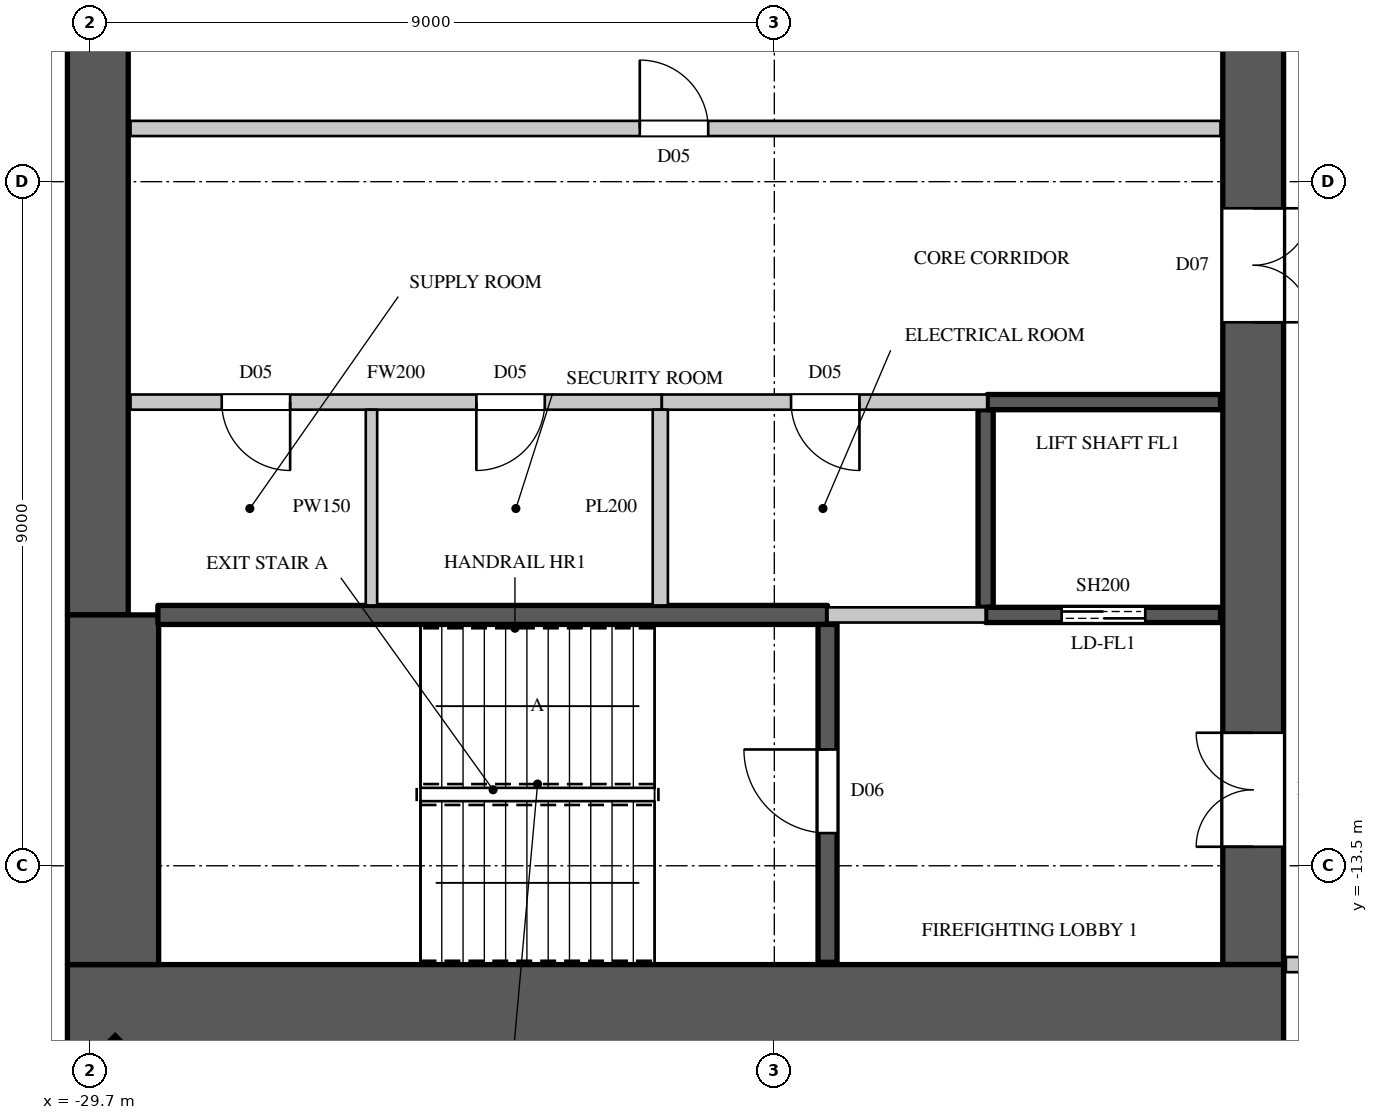
"""IFC4 building model, lengths in metres.
Left out: names, types, materials, properties, quantities, classifications, styles, units other than length and angle.
Written with IfcOpenShell. Run it as: python <this file> out.ifc"""

import sys

from ifc_helpers import new_model, si_unit, direction, frame, frame_2d, origin, origin_2d, place, context, subcontext, project, spatial, rectangle, extrude, element, fill, save


model = new_model("IFC4")
c1 = context("Model", 3, precision=1e-05, world=origin(), true_north=direction((0.0, 1.0)))
c2 = subcontext(c1, "Body", "Model", "MODEL_VIEW")
j1 = project(units=[si_unit("LENGTHUNIT", "METRE"), si_unit("PLANEANGLEUNIT", "RADIAN")], contexts=[c1])
p1 = place(None, origin())
s1 = spatial("IfcSite", under=j1, at=p1, CompositionType="ELEMENT")
p2 = place(p1, origin())
s2 = spatial("IfcBuilding", under=s1, at=p2, CompositionType="ELEMENT")
p3 = place(p2, frame((0.0, 0.0, 181.0)))
s3 = spatial("IfcBuildingStorey", under=s2, at=p3, CompositionType="ELEMENT", Elevation=181.0)
p4 = place(p3, frame((-29.443, -16.443, 0.0), z_axis=(0.0, 0.0, 1.0), x_axis=(0.707106781187, -0.707106781187, 0.0)))
e1 = element("IfcColumn", 1, at=p4, inside=s3, PredefinedType="COLUMN", context=c2, shape_type="SweptSolid", body=[
    extrude(rectangle(XDim=0.9, YDim=1.1, at=origin_2d()), origin(), (0.0, 0.0, 1.0), 4.1),
])
p5 = place(p3, frame((-30.0, -15.4, 0.0), z_axis=(0.0, 0.0, 1.0), x_axis=(1.0, 0.0, 0.0)))
e2 = element("IfcWall", 2, at=p5, inside=s3, PredefinedType="SHEAR", context=c2, shape_type="SweptSolid", body=[
    extrude(rectangle(XDim=16.0, YDim=1.2, at=frame_2d((8.0, 0.0))), origin(), (0.0, 0.0, 1.0), 4.1),
])
p6 = place(p3, frame((-14.4, -14.8, 0.0), z_axis=(0.0, 0.0, 1.0), x_axis=(0.0, 1.0, 0.0)))
e3 = element("IfcWall", 3, at=p6, inside=s3, PredefinedType="SHEAR", context=c2, shape_type="SweptSolid", body=[
    extrude(rectangle(XDim=29.6, YDim=0.8, at=frame_2d((14.8, 0.0))), origin(), (0.0, 0.0, 1.0), 4.1),
])
p7 = place(p6, frame((1.55, 0.0, 0.0)))
e4 = element("IfcOpeningElement", 4, at=p7, cuts=e3, PredefinedType="OPENING", context=c2, shape_type="SweptSolid", body=[
    extrude(rectangle(XDim=1.5, YDim=2.4, at=frame_2d((0.75, 1.2))), frame((0.0, 0.41, 0.0), z_axis=(0.0, -1.0, 0.0), x_axis=(1.0, 0.0, 0.0)), (0.0, 0.0, 1.0), 0.82),
])
p8 = place(p6, frame((26.55, 0.0, 0.0)))
e5 = element("IfcOpeningElement", 5, at=p8, cuts=e3, PredefinedType="OPENING", context=c2, shape_type="SweptSolid", body=[
    extrude(rectangle(XDim=1.5, YDim=2.4, at=frame_2d((0.75, 1.2))), frame((0.0, 0.41, 0.0), z_axis=(0.0, -1.0, 0.0), x_axis=(1.0, 0.0, 0.0)), (0.0, 0.0, 1.0), 0.82),
])
p9 = place(p6, frame((8.45, 0.0, 0.0)))
e6 = element("IfcOpeningElement", 6, at=p9, cuts=e3, PredefinedType="OPENING", context=c2, shape_type="SweptSolid", body=[
    extrude(rectangle(XDim=1.5, YDim=2.4, at=frame_2d((0.75, 1.2))), frame((0.0, 0.41, 0.0), z_axis=(0.0, -1.0, 0.0), x_axis=(1.0, 0.0, 0.0)), (0.0, 0.0, 1.0), 0.82),
])
p10 = place(p6, frame((19.65, 0.0, 0.0)))
e7 = element("IfcOpeningElement", 7, at=p10, cuts=e3, PredefinedType="OPENING", context=c2, shape_type="SweptSolid", body=[
    extrude(rectangle(XDim=1.5, YDim=2.4, at=frame_2d((0.75, 1.2))), frame((0.0, 0.41, 0.0), z_axis=(0.0, -1.0, 0.0), x_axis=(1.0, 0.0, 0.0)), (0.0, 0.0, 1.0), 0.82),
])
p11 = place(p6, frame((14.5, 0.0, 0.0)))
e8 = element("IfcOpeningElement", 8, at=p11, cuts=e3, PredefinedType="OPENING", context=c2, shape_type="SweptSolid", body=[
    extrude(rectangle(XDim=0.6, YDim=2.0, at=frame_2d((0.3, 1.0))), frame((0.0, 0.41, 0.0), z_axis=(0.0, -1.0, 0.0), x_axis=(1.0, 0.0, 0.0)), (0.0, 0.0, 1.0), 0.82),
])
p12 = place(p3, frame((-29.6, -10.2, 0.0), z_axis=(0.0, 0.0, 1.0), x_axis=(0.0, 1.0, 0.0)))
e9 = element("IfcWall", 9, at=p12, inside=s3, PredefinedType="SHEAR", context=c2, shape_type="SweptSolid", body=[
    extrude(rectangle(XDim=20.4, YDim=0.8, at=frame_2d((10.2, 0.0))), origin(), (0.0, 0.0, 1.0), 4.1),
])
p13 = place(p3, frame((-29.4, -14.8, 0.0), z_axis=(0.0, 0.0, 1.0), x_axis=(0.0, 1.0, 0.0)))
e10 = element("IfcWall", 10, at=p13, inside=s3, PredefinedType="SHEAR", context=c2, shape_type="SweptSolid", body=[
    extrude(rectangle(XDim=4.6, YDim=1.2, at=frame_2d((2.3, 0.0))), origin(), (0.0, 0.0, 1.0), 4.1),
])
p14 = place(p3, frame((-29.17, -7.4, 0.0), z_axis=(0.0, 0.0, 1.0), x_axis=(1.0, 0.0, 0.0)))
e11 = element("IfcWall", 11, at=p14, inside=s3, PredefinedType="PARTITIONING", context=c2, shape_type="SweptSolid", body=[
    extrude(rectangle(XDim=6.99, YDim=0.2, at=frame_2d((3.495, 0.0))), origin(), (0.0, 0.0, 1.0), 3.8),
])
p15 = place(p14, frame((1.2, 0.0, 0.0)))
e12 = element("IfcOpeningElement", 12, at=p15, cuts=e11, PredefinedType="OPENING", context=c2, shape_type="SweptSolid", body=[
    extrude(rectangle(XDim=0.9, YDim=2.2, at=frame_2d((0.45, 1.1))), frame((0.0, 0.11, 0.0), z_axis=(0.0, -1.0, 0.0), x_axis=(1.0, 0.0, 0.0)), (0.0, 0.0, 1.0), 0.22),
])
p16 = place(p14, frame((4.55, 0.0, 0.0)))
e13 = element("IfcOpeningElement", 13, at=p16, cuts=e11, PredefinedType="OPENING", context=c2, shape_type="SweptSolid", body=[
    extrude(rectangle(XDim=0.9, YDim=2.2, at=frame_2d((0.45, 1.1))), frame((0.0, 0.11, 0.0), z_axis=(0.0, -1.0, 0.0), x_axis=(1.0, 0.0, 0.0)), (0.0, 0.0, 1.0), 0.22),
])
p17 = place(p3, frame((-29.17, -3.8, 0.0), z_axis=(0.0, 0.0, 1.0), x_axis=(1.0, 0.0, 0.0)))
e14 = element("IfcWall", 14, at=p17, inside=s3, PredefinedType="PARTITIONING", context=c2, shape_type="SweptSolid", body=[
    extrude(rectangle(XDim=14.34, YDim=0.2, at=frame_2d((7.17, 0.0))), origin(), (0.0, 0.0, 1.0), 3.8),
])
p18 = place(p17, frame((6.7, 0.0, 0.0)))
e15 = element("IfcOpeningElement", 15, at=p18, cuts=e14, PredefinedType="OPENING", context=c2, shape_type="SweptSolid", body=[
    extrude(rectangle(XDim=0.9, YDim=2.2, at=frame_2d((0.45, 1.1))), frame((0.0, 0.11, 0.0), z_axis=(0.0, -1.0, 0.0), x_axis=(1.0, 0.0, 0.0)), (0.0, 0.0, 1.0), 0.22),
])
p19 = place(p3, frame((-13.97, -14.8, 0.0), z_axis=(0.0, 0.0, 1.0), x_axis=(1.0, 0.0, 0.0)))
e16 = element("IfcWall", 16, at=p19, inside=s3, PredefinedType="PARTITIONING", context=c2, shape_type="SweptSolid", body=[
    extrude(rectangle(XDim=2.87, YDim=0.2, at=frame_2d((1.435, 0.0))), origin(), (0.0, 0.0, 1.0), 3.8),
])
p20 = place(p3, frame((-26.0, -10.075, 0.0), z_axis=(0.0, 0.0, 1.0), x_axis=(0.0, 1.0, 0.0)))
e17 = element("IfcWall", 17, at=p20, inside=s3, PredefinedType="PARTITIONING", context=c2, shape_type="SweptSolid", body=[
    extrude(rectangle(XDim=2.575, YDim=0.15, at=frame_2d((1.288, 0.0))), origin(), (0.0, 0.0, 1.0), 3.8),
])
p21 = place(p3, frame((-22.18, -7.4, 0.0), z_axis=(0.0, 0.0, 1.0), x_axis=(1.0, 0.0, 0.0)))
e18 = element("IfcWall", 18, at=p21, inside=s3, PredefinedType="PARTITIONING", context=c2, shape_type="SweptSolid", body=[
    extrude(rectangle(XDim=4.28, YDim=0.2, at=frame_2d((2.14, 0.0))), origin(), (0.0, 0.0, 1.0), 3.8),
])
p22 = place(p21, frame((1.7, 0.0, 0.0)))
e19 = element("IfcOpeningElement", 19, at=p22, cuts=e18, PredefinedType="OPENING", context=c2, shape_type="SweptSolid", body=[
    extrude(rectangle(XDim=0.9, YDim=2.2, at=frame_2d((0.45, 1.1))), frame((0.0, 0.11, 0.0), z_axis=(0.0, -1.0, 0.0), x_axis=(1.0, 0.0, 0.0)), (0.0, 0.0, 1.0), 0.22),
])
p23 = place(p3, frame((-22.2, -10.075, 0.0), z_axis=(0.0, 0.0, 1.0), x_axis=(0.0, 1.0, 0.0)))
e20 = element("IfcWall", 20, at=p23, inside=s3, PredefinedType="PARTITIONING", context=c2, shape_type="SweptSolid", body=[
    extrude(rectangle(XDim=2.575, YDim=0.2, at=frame_2d((1.288, 0.0))), origin(), (0.0, 0.0, 1.0), 3.8),
])
p24 = place(p3, frame((-20.0, -10.2, 0.0), z_axis=(0.0, 0.0, 1.0), x_axis=(1.0, 0.0, 0.0)))
e21 = element("IfcWall", 21, at=p24, inside=s3, PredefinedType="PARTITIONING", context=c2, shape_type="SweptSolid", body=[
    extrude(rectangle(XDim=2.08, YDim=0.2, at=frame_2d((1.04, 0.0))), origin(), (0.0, 0.0, 1.0), 3.8),
])
p25 = place(p3, frame((-17.92, -10.1, 0.0), z_axis=(0.0, 0.0, 1.0), x_axis=(0.0, 1.0, 0.0)))
e22 = element("IfcWall", 22, at=p25, inside=s3, PredefinedType="SHEAR", context=c2, shape_type="SweptSolid", body=[
    extrude(rectangle(XDim=2.6, YDim=0.2, at=frame_2d((1.3, 0.0))), origin(), (0.0, 0.0, 1.0), 3.8),
])
p26 = place(p3, frame((-17.92, -10.2, 0.0), z_axis=(0.0, 0.0, 1.0), x_axis=(1.0, 0.0, 0.0)))
e23 = element("IfcWall", 23, at=p26, inside=s3, PredefinedType="SHEAR", context=c2, shape_type="SweptSolid", body=[
    extrude(rectangle(XDim=3.09, YDim=0.2, at=frame_2d((1.545, 0.0))), origin(), (0.0, 0.0, 1.0), 3.8),
])
p27 = place(p26, frame((1.0, 0.0, 0.0)))
e24 = element("IfcOpeningElement", 24, at=p27, cuts=e23, PredefinedType="OPENING", context=c2, shape_type="SweptSolid", body=[
    extrude(rectangle(XDim=1.1, YDim=2.2, at=frame_2d((0.55, 1.1))), frame((0.0, 0.11, 0.0), z_axis=(0.0, -1.0, 0.0), x_axis=(1.0, 0.0, 0.0)), (0.0, 0.0, 1.0), 0.22),
])
p28 = place(p3, frame((-17.9, -7.4, 0.0), z_axis=(0.0, 0.0, 1.0), x_axis=(1.0, 0.0, 0.0)))
e25 = element("IfcWall", 25, at=p28, inside=s3, PredefinedType="SHEAR", context=c2, shape_type="SweptSolid", body=[
    extrude(rectangle(XDim=3.07, YDim=0.2, at=frame_2d((1.535, 0.0))), origin(), (0.0, 0.0, 1.0), 3.8),
])
p29 = place(p3, frame((-28.81, -10.2, 0.0), z_axis=(0.0, 0.0, 1.0), x_axis=(1.0, 0.0, 0.0)))
e26 = element("IfcWall", 26, at=p29, inside=s3, PredefinedType="SHEAR", context=c2, shape_type="SweptSolid", body=[
    extrude(rectangle(XDim=8.81, YDim=0.25, at=frame_2d((4.405, 0.0))), origin(), (0.0, 0.0, 1.0), 3.8),
])
p30 = place(p3, frame((-20.0, -14.77, 0.0), z_axis=(0.0, 0.0, 1.0), x_axis=(0.0, 1.0, 0.0)))
e27 = element("IfcWall", 27, at=p30, inside=s3, PredefinedType="SHEAR", context=c2, shape_type="SweptSolid", body=[
    extrude(rectangle(XDim=4.445, YDim=0.25, at=frame_2d((2.223, 0.0))), origin(), (0.0, 0.0, 1.0), 3.8),
])
p31 = place(p30, frame((1.7, 0.0, 0.0)))
e28 = element("IfcOpeningElement", 28, at=p31, cuts=e27, PredefinedType="OPENING", context=c2, shape_type="SweptSolid", body=[
    extrude(rectangle(XDim=1.1, YDim=2.2, at=frame_2d((0.55, 1.1))), frame((0.0, 0.135, 0.0), z_axis=(0.0, -1.0, 0.0), x_axis=(1.0, 0.0, 0.0)), (0.0, 0.0, 1.0), 0.27),
])
p32 = place(p31, origin())
e29 = element("IfcDoor", 29, at=p32, inside=s3, OperationType="SINGLE_SWING_RIGHT", PredefinedType="DOOR", context=c2, shape_type="SweptSolid", body=[
    extrude(rectangle(XDim=1.1, YDim=2.2, at=frame_2d((0.55, 1.1))), frame((0.0, 0.025, 0.0), z_axis=(0.0, -1.0, 0.0), x_axis=(1.0, 0.0, 0.0)), (0.0, 0.0, 1.0), 0.05),
])
fill(e28, e29)
p33 = place(p15, origin())
e30 = element("IfcDoor", 30, at=p33, inside=s3, OperationType="SINGLE_SWING_LEFT", PredefinedType="DOOR", context=c2, shape_type="SweptSolid", body=[
    extrude(rectangle(XDim=0.9, YDim=2.2, at=frame_2d((0.45, 1.1))), frame((0.0, 0.025, 0.0), z_axis=(0.0, -1.0, 0.0), x_axis=(1.0, 0.0, 0.0)), (0.0, 0.0, 1.0), 0.05),
])
fill(e12, e30)
p34 = place(p16, origin())
e31 = element("IfcDoor", 31, at=p34, inside=s3, OperationType="SINGLE_SWING_RIGHT", PredefinedType="DOOR", context=c2, shape_type="SweptSolid", body=[
    extrude(rectangle(XDim=0.9, YDim=2.2, at=frame_2d((0.45, 1.1))), frame((0.0, 0.025, 0.0), z_axis=(0.0, -1.0, 0.0), x_axis=(1.0, 0.0, 0.0)), (0.0, 0.0, 1.0), 0.05),
])
fill(e13, e31)
p35 = place(p22, origin())
e32 = element("IfcDoor", 32, at=p35, inside=s3, OperationType="SINGLE_SWING_LEFT", PredefinedType="DOOR", context=c2, shape_type="SweptSolid", body=[
    extrude(rectangle(XDim=0.9, YDim=2.2, at=frame_2d((0.45, 1.1))), frame((0.0, 0.025, 0.0), z_axis=(0.0, -1.0, 0.0), x_axis=(1.0, 0.0, 0.0)), (0.0, 0.0, 1.0), 0.05),
])
fill(e19, e32)
p36 = place(p18, origin())
e33 = element("IfcDoor", 33, at=p36, inside=s3, OperationType="SINGLE_SWING_LEFT", PredefinedType="DOOR", context=c2, shape_type="SweptSolid", body=[
    extrude(rectangle(XDim=0.9, YDim=2.2, at=frame_2d((0.45, 1.1))), frame((0.0, 0.025, 0.0), z_axis=(0.0, -1.0, 0.0), x_axis=(1.0, 0.0, 0.0)), (0.0, 0.0, 1.0), 0.05),
])
fill(e15, e33)
p37 = place(p27, origin())
e34 = element("IfcDoor", 34, at=p37, inside=s3, OperationType="DOUBLE_DOOR_SLIDING", PredefinedType="DOOR", context=c2, shape_type="SweptSolid", body=[
    extrude(rectangle(XDim=1.1, YDim=2.2, at=frame_2d((0.55, 1.1))), frame((0.0, 0.025, 0.0), z_axis=(0.0, -1.0, 0.0), x_axis=(1.0, 0.0, 0.0)), (0.0, 0.0, 1.0), 0.05),
])
fill(e24, e34)
p38 = place(p7, origin())
e35 = element("IfcDoor", 35, at=p38, inside=s3, OperationType="DOUBLE_DOOR_SINGLE_SWING", PredefinedType="DOOR", context=c2, shape_type="SweptSolid", body=[
    extrude(rectangle(XDim=1.5, YDim=2.4, at=frame_2d((0.75, 1.2))), frame((0.0, 0.395, 0.0), z_axis=(0.0, -1.0, 0.0), x_axis=(1.0, 0.0, 0.0)), (0.0, 0.0, 1.0), 0.05),
])
fill(e4, e35)
p39 = place(p9, origin())
e36 = element("IfcDoor", 36, at=p39, inside=s3, OperationType="DOUBLE_DOOR_SINGLE_SWING", PredefinedType="DOOR", context=c2, shape_type="SweptSolid", body=[
    extrude(rectangle(XDim=1.5, YDim=2.4, at=frame_2d((0.75, 1.2))), frame((0.0, -0.345, 0.0), z_axis=(0.0, -1.0, 0.0), x_axis=(1.0, 0.0, 0.0)), (0.0, 0.0, 1.0), 0.05),
])
fill(e6, e36)
save(model, sys.argv[1])
